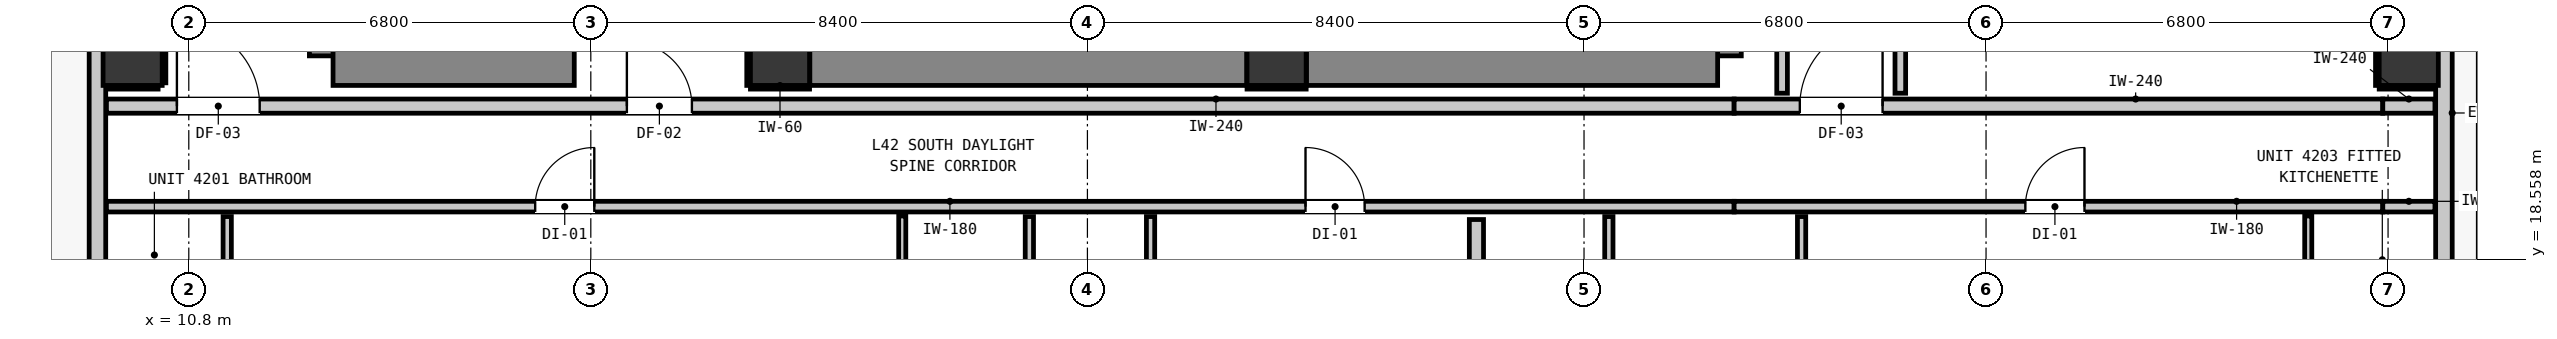
"""IFC4 building model, lengths in metres.
Left out: names, types, materials, properties, quantities, classifications, styles, units other than length and angle.
Written with IfcOpenShell. Run it as: python <this file> out.ifc"""

import sys

from ifc_helpers import new_model, si_unit, direction, frame, frame_2d, origin, origin_2d, place, context, subcontext, project, spatial, rectangle, extrude, element, fill, save


model = new_model("IFC4")
c1 = context("Model", 3, precision=1e-05, world=origin(), true_north=direction((0.0, 1.0)))
c2 = subcontext(c1, "Body", "Model", "MODEL_VIEW")
j1 = project(units=[si_unit("LENGTHUNIT", "METRE"), si_unit("PLANEANGLEUNIT", "RADIAN")], contexts=[c1])
p1 = place(None, origin())
s1 = spatial("IfcSite", under=j1, at=p1, CompositionType="ELEMENT")
p2 = place(p1, origin())
s2 = spatial("IfcBuilding", under=s1, at=p2, CompositionType="ELEMENT")
p3 = place(p2, frame((0.0, 0.0, 145.92)))
s3 = spatial("IfcBuildingStorey", under=s2, at=p3, CompositionType="ELEMENT", Elevation=145.92)
for number, where, z_axis, x_axis in (
    (1, (20.8, 22.0, 0.0), (0.0, 0.0, 1.0), (1.0, 0.0, 0.0)),
    (2, (29.2, 22.0, 0.0), (0.0, 0.0, 1.0), (1.0, 0.0, 0.0)),
):
    element("IfcColumn", number, at=place(p3, frame(where, z_axis=z_axis, x_axis=x_axis)), inside=s3, PredefinedType="COLUMN", context=c2, shape_type="SweptSolid", body=[
        extrude(rectangle(XDim=1.0, YDim=1.0, at=origin_2d()), origin(), (0.0, 0.0, 1.0), 3.32),
    ])
p4 = place(p3, frame((13.34, 22.0, 0.0), z_axis=(0.0, 0.0, 1.0), x_axis=(0.0, 1.0, 0.0)))
e3 = element("IfcWall", 3, at=p4, inside=s3, PredefinedType="SHEAR", context=c2, shape_type="SweptSolid", body=[
    extrude(rectangle(XDim=8.195, YDim=1.0, at=frame_2d((4.098, 0.0))), origin(), (0.0, 0.0, 1.0), 3.32),
])
p5 = place(p3, frame((13.24, 22.0, 0.0), z_axis=(0.0, 0.0, 1.0), x_axis=(1.0, 0.0, 0.0)))
e4 = element("IfcWall", 4, at=p5, inside=s3, PredefinedType="SHEAR", context=c2, shape_type="SweptSolid", body=[
    extrude(rectangle(XDim=4.08, YDim=1.0, at=frame_2d((2.04, 0.0))), origin(), (0.0, 0.0, 1.0), 3.32),
])
p6 = place(p3, frame((36.56, 22.0, 0.0), z_axis=(0.0, 0.0, 1.0), x_axis=(0.0, 1.0, 0.0)))
e5 = element("IfcWall", 5, at=p6, inside=s3, PredefinedType="SHEAR", context=c2, shape_type="SweptSolid", body=[
    extrude(rectangle(XDim=8.195, YDim=1.0, at=frame_2d((4.098, 0.0))), origin(), (0.0, 0.0, 1.0), 3.32),
])
p7 = place(p3, frame((29.705, 22.0, 0.0), z_axis=(0.0, 0.0, 1.0), x_axis=(1.0, 0.0, 0.0)))
e6 = element("IfcWall", 6, at=p7, inside=s3, PredefinedType="SHEAR", context=c2, shape_type="SweptSolid", body=[
    extrude(rectangle(XDim=6.955, YDim=1.0, at=frame_2d((3.478, 0.0))), origin(), (0.0, 0.0, 1.0), 3.32),
])
p8 = place(p3, frame((21.305, 22.0, 0.0), z_axis=(0.0, 0.0, 1.0), x_axis=(1.0, 0.0, 0.0)))
e7 = element("IfcWall", 7, at=p8, inside=s3, PredefinedType="SHEAR", context=c2, shape_type="SweptSolid", body=[
    extrude(rectangle(XDim=7.39, YDim=1.0, at=frame_2d((3.695, 0.0))), origin(), (0.0, 0.0, 1.0), 3.32),
])
for number, where, z_axis, x_axis in (
    (8, (9.85, 22.0, -0.2), (0.0, 0.0, 1.0), (1.0, 0.0, 0.0)),
    (9, (48.35, 22.0, -0.2), (0.0, 0.0, 1.0), (1.0, 0.0, 0.0)),
):
    element("IfcColumn", number, at=place(p3, frame(where, z_axis=z_axis, x_axis=x_axis)), inside=s3, PredefinedType="COLUMN", context=c2, shape_type="SweptSolid", body=[
        extrude(rectangle(XDim=1.0, YDim=1.0, at=origin_2d()), origin(), (0.0, 0.0, 1.0), 3.52),
    ])
p9 = place(p3, frame((9.255, 17.555, 0.0), z_axis=(0.0, 0.0, 1.0), x_axis=(0.0, 1.0, 0.0)))
e10 = element("IfcWall", 10, at=p9, inside=s3, PredefinedType="STANDARD", context=c2, shape_type="SweptSolid", body=[
    extrude(rectangle(XDim=32.29, YDim=0.28, at=frame_2d((16.145, 0.0))), origin(), (0.0, 0.0, 1.0), 3.08),
])
p10 = place(p9, frame((5.467, 0.0, 0.0)))
e11 = element("IfcOpeningElement", 11, at=p10, cuts=e10, PredefinedType="OPENING", context=c2, shape_type="SweptSolid", body=[
    extrude(rectangle(XDim=1.0, YDim=2.15, at=frame_2d((0.5, 1.075))), frame((0.0, 0.15, 0.0), z_axis=(0.0, -1.0, 0.0), x_axis=(1.0, 0.0, 0.0)), (0.0, 0.0, 1.0), 0.3),
])
p11 = place(p9, frame((30.753, 0.0, 0.85)))
e12 = element("IfcOpeningElement", 12, at=p11, cuts=e10, PredefinedType="OPENING", context=c2, shape_type="SweptSolid", body=[
    extrude(rectangle(XDim=1.05, YDim=1.65, at=frame_2d((0.525, 0.825))), frame((0.0, 0.15, 0.0), z_axis=(0.0, -1.0, 0.0), x_axis=(1.0, 0.0, 0.0)), (0.0, 0.0, 1.0), 0.3),
])
p12 = place(p3, frame((48.945, 49.845, 0.0), z_axis=(0.0, 0.0, 1.0), x_axis=(0.0, -1.0, 0.0)))
e13 = element("IfcWall", 13, at=p12, inside=s3, PredefinedType="STANDARD", context=c2, shape_type="SweptSolid", body=[
    extrude(rectangle(XDim=32.29, YDim=0.28, at=frame_2d((16.145, 0.0))), origin(), (0.0, 0.0, 1.0), 3.08),
])
p13 = place(p12, frame((0.904, 0.0, 0.0)))
e14 = element("IfcOpeningElement", 14, at=p13, cuts=e13, PredefinedType="OPENING", context=c2, shape_type="SweptSolid", body=[
    extrude(rectangle(XDim=1.0, YDim=2.15, at=frame_2d((0.5, 1.075))), frame((0.0, 0.15, 0.0), z_axis=(0.0, -1.0, 0.0), x_axis=(1.0, 0.0, 0.0)), (0.0, 0.0, 1.0), 0.3),
])
p14 = place(p12, frame((2.774, 0.0, 0.85)))
e15 = element("IfcOpeningElement", 15, at=p14, cuts=e13, PredefinedType="OPENING", context=c2, shape_type="SweptSolid", body=[
    extrude(rectangle(XDim=1.65, YDim=1.75, at=frame_2d((0.825, 0.875))), frame((0.0, 0.15, 0.0), z_axis=(0.0, -1.0, 0.0), x_axis=(1.0, 0.0, 0.0)), (0.0, 0.0, 1.0), 0.3),
])
p15 = place(p12, frame((23.582, 0.0, 0.85)))
e16 = element("IfcOpeningElement", 16, at=p15, cuts=e13, PredefinedType="OPENING", context=c2, shape_type="SweptSolid", body=[
    extrude(rectangle(XDim=1.65, YDim=1.75, at=frame_2d((0.825, 0.875))), frame((0.0, 0.15, 0.0), z_axis=(0.0, -1.0, 0.0), x_axis=(1.0, 0.0, 0.0)), (0.0, 0.0, 1.0), 0.3),
])
p16 = place(p12, frame((20.433, 0.0, 0.85)))
e17 = element("IfcOpeningElement", 17, at=p16, cuts=e13, PredefinedType="OPENING", context=c2, shape_type="SweptSolid", body=[
    extrude(rectangle(XDim=1.65, YDim=1.75, at=frame_2d((0.825, 0.875))), frame((0.0, 0.15, 0.0), z_axis=(0.0, -1.0, 0.0), x_axis=(1.0, 0.0, 0.0)), (0.0, 0.0, 1.0), 0.3),
])
p17 = place(p12, frame((14.048, 0.0, 0.85)))
e18 = element("IfcOpeningElement", 18, at=p17, cuts=e13, PredefinedType="OPENING", context=c2, shape_type="SweptSolid", body=[
    extrude(rectangle(XDim=1.65, YDim=1.75, at=frame_2d((0.825, 0.875))), frame((0.0, 0.15, 0.0), z_axis=(0.0, -1.0, 0.0), x_axis=(1.0, 0.0, 0.0)), (0.0, 0.0, 1.0), 0.3),
])
p18 = place(p12, frame((11.247, 0.0, 0.85)))
e19 = element("IfcOpeningElement", 19, at=p18, cuts=e13, PredefinedType="OPENING", context=c2, shape_type="SweptSolid", body=[
    extrude(rectangle(XDim=1.05, YDim=1.65, at=frame_2d((0.525, 0.825))), frame((0.0, 0.15, 0.0), z_axis=(0.0, -1.0, 0.0), x_axis=(1.0, 0.0, 0.0)), (0.0, 0.0, 1.0), 0.3),
])
p19 = place(p3, frame((9.407, 21.15, 0.0), z_axis=(0.0, 0.0, 1.0), x_axis=(1.0, 0.0, 0.0)))
e20 = element("IfcWall", 20, at=p19, inside=s3, PredefinedType="PARTITIONING", context=c2, shape_type="SweptSolid", body=[
    extrude(rectangle(XDim=27.532, YDim=0.24, at=frame_2d((13.766, 0.0))), origin(), (0.0, 0.0, 1.0), 3.08),
])
p20 = place(p19, frame((8.803, 0.0, 0.0)))
e21 = element("IfcOpeningElement", 21, at=p20, cuts=e20, PredefinedType="OPENING", context=c2, shape_type="SweptSolid", body=[
    extrude(rectangle(XDim=1.1, YDim=2.15, at=frame_2d((0.55, 1.075))), frame((0.0, 0.13, 0.0), z_axis=(0.0, -1.0, 0.0), x_axis=(1.0, 0.0, 0.0)), (0.0, 0.0, 1.0), 0.26),
])
p21 = place(p19, frame((1.192, 0.0, 0.0)))
e22 = element("IfcOpeningElement", 22, at=p21, cuts=e20, PredefinedType="OPENING", context=c2, shape_type="SweptSolid", body=[
    extrude(rectangle(XDim=1.4, YDim=2.15, at=frame_2d((0.7, 1.075))), frame((0.0, 0.13, 0.0), z_axis=(0.0, -1.0, 0.0), x_axis=(1.0, 0.0, 0.0)), (0.0, 0.0, 1.0), 0.26),
])
p22 = place(p3, frame((36.939, 21.15, 0.0), z_axis=(0.0, 0.0, 1.0), x_axis=(1.0, 0.0, 0.0)))
e23 = element("IfcWall", 23, at=p22, inside=s3, PredefinedType="PARTITIONING", context=c2, shape_type="SweptSolid", body=[
    extrude(rectangle(XDim=10.972, YDim=0.24, at=frame_2d((5.486, 0.0))), origin(), (0.0, 0.0, 1.0), 2.565),
])
p23 = place(p22, frame((1.111, 0.0, 0.0)))
e24 = element("IfcOpeningElement", 24, at=p23, cuts=e23, PredefinedType="OPENING", context=c2, shape_type="SweptSolid", body=[
    extrude(rectangle(XDim=1.4, YDim=2.15, at=frame_2d((0.7, 1.075))), frame((0.0, 0.13, 0.0), z_axis=(0.0, -1.0, 0.0), x_axis=(1.0, 0.0, 0.0)), (0.0, 0.0, 1.0), 0.26),
])
p24 = place(p3, frame((47.911, 21.15, 0.0), z_axis=(0.0, 0.0, 1.0), x_axis=(1.0, 0.0, 0.0)))
e25 = element("IfcWall", 25, at=p24, inside=s3, PredefinedType="PARTITIONING", context=c2, shape_type="SweptSolid", body=[
    extrude(rectangle(XDim=0.882, YDim=0.24, at=frame_2d((0.441, 0.0))), origin(), (0.0, 0.0, 1.0), 3.08),
])
p25 = place(p3, frame((9.407, 19.45, 0.0), z_axis=(0.0, 0.0, 1.0), x_axis=(1.0, 0.0, 0.0)))
e26 = element("IfcWall", 26, at=p25, inside=s3, PredefinedType="PARTITIONING", context=c2, shape_type="SweptSolid", body=[
    extrude(rectangle(XDim=27.532, YDim=0.18, at=frame_2d((13.766, 0.0))), origin(), (0.0, 0.0, 1.0), 3.08),
])
p26 = place(p25, frame((7.252, 0.0, 0.0)))
e27 = element("IfcOpeningElement", 27, at=p26, cuts=e26, PredefinedType="OPENING", context=c2, shape_type="SweptSolid", body=[
    extrude(rectangle(XDim=1.0, YDim=2.15, at=frame_2d((0.5, 1.075))), frame((0.0, 0.1, 0.0), z_axis=(0.0, -1.0, 0.0), x_axis=(1.0, 0.0, 0.0)), (0.0, 0.0, 1.0), 0.2),
])
p27 = place(p25, frame((20.282, 0.0, 0.0)))
e28 = element("IfcOpeningElement", 28, at=p27, cuts=e26, PredefinedType="OPENING", context=c2, shape_type="SweptSolid", body=[
    extrude(rectangle(XDim=1.0, YDim=2.15, at=frame_2d((0.5, 1.075))), frame((0.0, 0.1, 0.0), z_axis=(0.0, -1.0, 0.0), x_axis=(1.0, 0.0, 0.0)), (0.0, 0.0, 1.0), 0.2),
])
p28 = place(p3, frame((36.939, 19.45, 0.0), z_axis=(0.0, 0.0, 1.0), x_axis=(1.0, 0.0, 0.0)))
e29 = element("IfcWall", 29, at=p28, inside=s3, PredefinedType="PARTITIONING", context=c2, shape_type="SweptSolid", body=[
    extrude(rectangle(XDim=10.972, YDim=0.18, at=frame_2d((5.486, 0.0))), origin(), (0.0, 0.0, 1.0), 2.565),
])
p29 = place(p28, frame((4.926, 0.0, 0.0)))
e30 = element("IfcOpeningElement", 30, at=p29, cuts=e29, PredefinedType="OPENING", context=c2, shape_type="SweptSolid", body=[
    extrude(rectangle(XDim=1.0, YDim=2.15, at=frame_2d((0.5, 1.075))), frame((0.0, 0.1, 0.0), z_axis=(0.0, -1.0, 0.0), x_axis=(1.0, 0.0, 0.0)), (0.0, 0.0, 1.0), 0.2),
])
p30 = place(p3, frame((47.911, 19.45, 0.0), z_axis=(0.0, 0.0, 1.0), x_axis=(1.0, 0.0, 0.0)))
e31 = element("IfcWall", 31, at=p30, inside=s3, PredefinedType="PARTITIONING", context=c2, shape_type="SweptSolid", body=[
    extrude(rectangle(XDim=0.882, YDim=0.18, at=frame_2d((0.441, 0.0))), origin(), (0.0, 0.0, 1.0), 3.08),
])
p31 = place(p3, frame((32.58, 15.407, 0.0), z_axis=(0.0, 0.0, 1.0), x_axis=(0.0, 1.0, 0.0)))
e32 = element("IfcWall", 32, at=p31, inside=s3, PredefinedType="PARTITIONING", context=c2, shape_type="SweptSolid", body=[
    extrude(rectangle(XDim=3.825, YDim=0.24, at=frame_2d((1.913, 0.0))), origin(), (0.0, 0.0, 1.0), 3.08),
])
p32 = place(p31, frame((1.568, 0.0, 0.0)))
e33 = element("IfcOpeningElement", 33, at=p32, cuts=e32, PredefinedType="OPENING", context=c2, shape_type="SweptSolid", body=[
    extrude(rectangle(XDim=0.9, YDim=2.1, at=frame_2d((0.45, 1.05))), frame((0.0, 0.13, 0.0), z_axis=(0.0, -1.0, 0.0), x_axis=(1.0, 0.0, 0.0)), (0.0, 0.0, 1.0), 0.26),
])
p33 = place(p3, frame((37.75, 21.368, 0.0), z_axis=(0.0, 0.0, 1.0), x_axis=(0.0, 1.0, 0.0)))
e34 = element("IfcWall", 34, at=p33, inside=s3, PredefinedType="PARTITIONING", context=c2, shape_type="SweptSolid", body=[
    extrude(rectangle(XDim=18.694, YDim=0.18, at=frame_2d((9.347, 0.0))), origin(), (0.0, 0.0, 1.0), 3.08),
])
p34 = place(p3, frame((39.75, 21.368, 0.0), z_axis=(0.0, 0.0, 1.0), x_axis=(0.0, 1.0, 0.0)))
e35 = element("IfcWall", 35, at=p34, inside=s3, PredefinedType="PARTITIONING", context=c2, shape_type="SweptSolid", body=[
    extrude(rectangle(XDim=2.074, YDim=0.18, at=frame_2d((1.037, 0.0))), origin(), (0.0, 0.0, 1.0), 3.08),
])
p35 = place(p3, frame((11.45, 16.278, 0.0), z_axis=(0.0, 0.0, 1.0), x_axis=(0.0, 1.0, 0.0)))
e36 = element("IfcWall", 36, at=p35, inside=s3, PredefinedType="PARTITIONING", context=c2, shape_type="SweptSolid", body=[
    extrude(rectangle(XDim=3.004, YDim=0.14, at=frame_2d((1.502, 0.0))), origin(), (0.0, 0.0, 1.0), 2.565),
])
p36 = place(p35, frame((0.717, 0.0, 0.0)))
e37 = element("IfcOpeningElement", 37, at=p36, cuts=e36, PredefinedType="OPENING", context=c2, shape_type="SweptSolid", body=[
    extrude(rectangle(XDim=0.86, YDim=2.02, at=frame_2d((0.43, 1.01))), frame((0.0, 0.08, 0.0), z_axis=(0.0, -1.0, 0.0), x_axis=(1.0, 0.0, 0.0)), (0.0, 0.0, 1.0), 0.16),
])
p37 = place(p3, frame((25.018, 15.407, 0.0), z_axis=(0.0, 0.0, 1.0), x_axis=(0.0, 1.0, 0.0)))
e38 = element("IfcWall", 38, at=p37, inside=s3, PredefinedType="PARTITIONING", context=c2, shape_type="SweptSolid", body=[
    extrude(rectangle(XDim=3.875, YDim=0.14, at=frame_2d((1.938, 0.0))), origin(), (0.0, 0.0, 1.0), 3.08),
])
p38 = place(p3, frame((27.068, 15.407, 0.0), z_axis=(0.0, 0.0, 1.0), x_axis=(0.0, 1.0, 0.0)))
e39 = element("IfcWall", 39, at=p38, inside=s3, PredefinedType="PARTITIONING", context=c2, shape_type="SweptSolid", body=[
    extrude(rectangle(XDim=3.875, YDim=0.14, at=frame_2d((1.938, 0.0))), origin(), (0.0, 0.0, 1.0), 3.08),
])
p39 = place(p38, frame((1.588, 0.0, 0.0)))
e40 = element("IfcOpeningElement", 40, at=p39, cuts=e39, PredefinedType="OPENING", context=c2, shape_type="SweptSolid", body=[
    extrude(rectangle(XDim=0.86, YDim=2.02, at=frame_2d((0.43, 1.01))), frame((0.0, 0.08, 0.0), z_axis=(0.0, -1.0, 0.0), x_axis=(1.0, 0.0, 0.0)), (0.0, 0.0, 1.0), 0.16),
])
p40 = place(p3, frame((34.82, 15.407, 0.0), z_axis=(0.0, 0.0, 1.0), x_axis=(0.0, 1.0, 0.0)))
e41 = element("IfcWall", 41, at=p40, inside=s3, PredefinedType="PARTITIONING", context=c2, shape_type="SweptSolid", body=[
    extrude(rectangle(XDim=3.875, YDim=0.14, at=frame_2d((1.938, 0.0))), origin(), (0.0, 0.0, 1.0), 3.08),
])
p41 = place(p3, frame((38.08, 15.407, 0.0), z_axis=(0.0, 0.0, 1.0), x_axis=(0.0, 1.0, 0.0)))
e42 = element("IfcWall", 42, at=p41, inside=s3, PredefinedType="PARTITIONING", context=c2, shape_type="SweptSolid", body=[
    extrude(rectangle(XDim=3.875, YDim=0.14, at=frame_2d((1.938, 0.0))), origin(), (0.0, 0.0, 1.0), 3.08),
])
p42 = place(p41, frame((1.588, 0.0, 0.0)))
e43 = element("IfcOpeningElement", 43, at=p42, cuts=e42, PredefinedType="OPENING", context=c2, shape_type="SweptSolid", body=[
    extrude(rectangle(XDim=0.86, YDim=2.02, at=frame_2d((0.43, 1.01))), frame((0.0, 0.08, 0.0), z_axis=(0.0, -1.0, 0.0), x_axis=(1.0, 0.0, 0.0)), (0.0, 0.0, 1.0), 0.16),
])
p43 = place(p3, frame((22.868, 15.407, 0.0), z_axis=(0.0, 0.0, 1.0), x_axis=(0.0, 1.0, 0.0)))
e44 = element("IfcWall", 44, at=p43, inside=s3, PredefinedType="PARTITIONING", context=c2, shape_type="SweptSolid", body=[
    extrude(rectangle(XDim=3.885, YDim=0.12, at=frame_2d((1.942, 0.0))), origin(), (0.0, 0.0, 1.0), 3.08),
])
p44 = place(p43, frame((1.568, 0.0, 0.0)))
e45 = element("IfcOpeningElement", 45, at=p44, cuts=e44, PredefinedType="OPENING", context=c2, shape_type="SweptSolid", body=[
    extrude(rectangle(XDim=0.9, YDim=2.1, at=frame_2d((0.45, 1.05))), frame((0.0, 0.07, 0.0), z_axis=(0.0, -1.0, 0.0), x_axis=(1.0, 0.0, 0.0)), (0.0, 0.0, 1.0), 0.14),
])
p45 = place(p3, frame((46.65, 15.475, 0.0), z_axis=(0.0, 0.0, 1.0), x_axis=(0.0, 1.0, 0.0)))
e46 = element("IfcWall", 46, at=p45, inside=s3, PredefinedType="PARTITIONING", context=c2, shape_type="SweptSolid", body=[
    extrude(rectangle(XDim=3.817, YDim=0.12, at=frame_2d((1.908, 0.0))), origin(), (0.0, 0.0, 1.0), 3.08),
])
p46 = place(p45, frame((1.5, 0.0, 0.0)))
e47 = element("IfcOpeningElement", 47, at=p46, cuts=e46, PredefinedType="OPENING", context=c2, shape_type="SweptSolid", body=[
    extrude(rectangle(XDim=0.9, YDim=2.1, at=frame_2d((0.45, 1.05))), frame((0.0, 0.07, 0.0), z_axis=(0.0, -1.0, 0.0), x_axis=(1.0, 0.0, 0.0)), (0.0, 0.0, 1.0), 0.14),
])
for number, where, z_axis, x_axis in (
    (48, (20.3, 21.468, 0.0), (0.0, 0.0, 1.0), (1.0, 0.0, 0.0)),
    (49, (20.268, 21.5, 0.0), (0.0, 0.0, 1.0), (0.0, 1.0, 0.0)),
    (50, (28.7, 21.468, 0.0), (0.0, 0.0, 1.0), (1.0, 0.0, 0.0)),
):
    element("IfcWall", number, at=place(p3, frame(where, z_axis=z_axis, x_axis=x_axis)), inside=s3, PredefinedType="PARTITIONING", context=c2, shape_type="SweptSolid", body=[
        extrude(rectangle(XDim=1.0, YDim=0.06, at=frame_2d((0.5, 0.0))), origin(), (0.0, 0.0, 1.0), 1.45),
    ])
p47 = place(p3, frame((9.41, 21.468, 0.0), z_axis=(0.0, 0.0, 1.0), x_axis=(1.0, 0.0, 0.0)))
e51 = element("IfcWall", 51, at=p47, inside=s3, PredefinedType="PARTITIONING", context=c2, shape_type="SweptSolid", body=[
    extrude(rectangle(XDim=0.871, YDim=0.06, at=frame_2d((0.436, 0.0))), origin(), (0.0, 0.0, 1.0), 1.45),
])
p48 = place(p3, frame((10.382, 21.544, 0.0), z_axis=(0.0, 0.0, 1.0), x_axis=(0.0, 1.0, 0.0)))
e52 = element("IfcWall", 52, at=p48, inside=s3, PredefinedType="PARTITIONING", context=c2, shape_type="SweptSolid", body=[
    extrude(rectangle(XDim=0.956, YDim=0.06, at=frame_2d((0.478, 0.0))), origin(), (0.0, 0.0, 1.0), 1.45),
])
p49 = place(p3, frame((47.85, 21.468, 0.0), z_axis=(0.0, 0.0, 1.0), x_axis=(1.0, 0.0, 0.0)))
e53 = element("IfcWall", 53, at=p49, inside=s3, PredefinedType="PARTITIONING", context=c2, shape_type="SweptSolid", body=[
    extrude(rectangle(XDim=0.94, YDim=0.06, at=frame_2d((0.47, 0.0))), origin(), (0.0, 0.0, 1.0), 1.45),
])
p50 = place(p3, frame((47.818, 21.5, 0.0), z_axis=(0.0, 0.0, 1.0), x_axis=(0.0, 1.0, 0.0)))
e54 = element("IfcWall", 54, at=p50, inside=s3, PredefinedType="PARTITIONING", context=c2, shape_type="SweptSolid", body=[
    extrude(rectangle(XDim=1.0, YDim=0.06, at=frame_2d((0.5, 0.0))), origin(), (0.0, 0.0, 1.0), 1.45),
])
p51 = place(p20, origin())
e55 = element("IfcDoor", 55, at=p51, inside=s3, OperationType="SINGLE_SWING_LEFT", PredefinedType="DOOR", context=c2, shape_type="SweptSolid", body=[
    extrude(rectangle(XDim=1.1, YDim=2.15, at=frame_2d((0.55, 1.075))), frame((0.0, 0.025, 0.0), z_axis=(0.0, -1.0, 0.0), x_axis=(1.0, 0.0, 0.0)), (0.0, 0.0, 1.0), 0.05),
])
fill(e21, e55)
p52 = place(p21, origin())
e56 = element("IfcDoor", 56, at=p52, inside=s3, OperationType="SINGLE_SWING_LEFT", PredefinedType="DOOR", context=c2, shape_type="SweptSolid", body=[
    extrude(rectangle(XDim=1.4, YDim=2.15, at=frame_2d((0.7, 1.075))), frame((0.0, 0.025, 0.0), z_axis=(0.0, -1.0, 0.0), x_axis=(1.0, 0.0, 0.0)), (0.0, 0.0, 1.0), 0.05),
])
fill(e22, e56)
p53 = place(p23, origin())
e57 = element("IfcDoor", 57, at=p53, inside=s3, OperationType="SINGLE_SWING_RIGHT", PredefinedType="DOOR", context=c2, shape_type="SweptSolid", body=[
    extrude(rectangle(XDim=1.4, YDim=2.15, at=frame_2d((0.7, 1.075))), frame((0.0, 0.025, 0.0), z_axis=(0.0, -1.0, 0.0), x_axis=(1.0, 0.0, 0.0)), (0.0, 0.0, 1.0), 0.05),
])
fill(e24, e57)
p54 = place(p26, origin())
e58 = element("IfcDoor", 58, at=p54, inside=s3, OperationType="SINGLE_SWING_RIGHT", PredefinedType="DOOR", context=c2, shape_type="SweptSolid", body=[
    extrude(rectangle(XDim=1.0, YDim=2.15, at=frame_2d((0.5, 1.075))), frame((0.0, 0.025, 0.0), z_axis=(0.0, -1.0, 0.0), x_axis=(1.0, 0.0, 0.0)), (0.0, 0.0, 1.0), 0.05),
])
fill(e27, e58)
p55 = place(p27, origin())
e59 = element("IfcDoor", 59, at=p55, inside=s3, OperationType="SINGLE_SWING_LEFT", PredefinedType="DOOR", context=c2, shape_type="SweptSolid", body=[
    extrude(rectangle(XDim=1.0, YDim=2.15, at=frame_2d((0.5, 1.075))), frame((0.0, 0.025, 0.0), z_axis=(0.0, -1.0, 0.0), x_axis=(1.0, 0.0, 0.0)), (0.0, 0.0, 1.0), 0.05),
])
fill(e28, e59)
p56 = place(p29, origin())
e60 = element("IfcDoor", 60, at=p56, inside=s3, OperationType="SINGLE_SWING_RIGHT", PredefinedType="DOOR", context=c2, shape_type="SweptSolid", body=[
    extrude(rectangle(XDim=1.0, YDim=2.15, at=frame_2d((0.5, 1.075))), frame((0.0, 0.025, 0.0), z_axis=(0.0, -1.0, 0.0), x_axis=(1.0, 0.0, 0.0)), (0.0, 0.0, 1.0), 0.05),
])
fill(e30, e60)
save(model, sys.argv[1])
